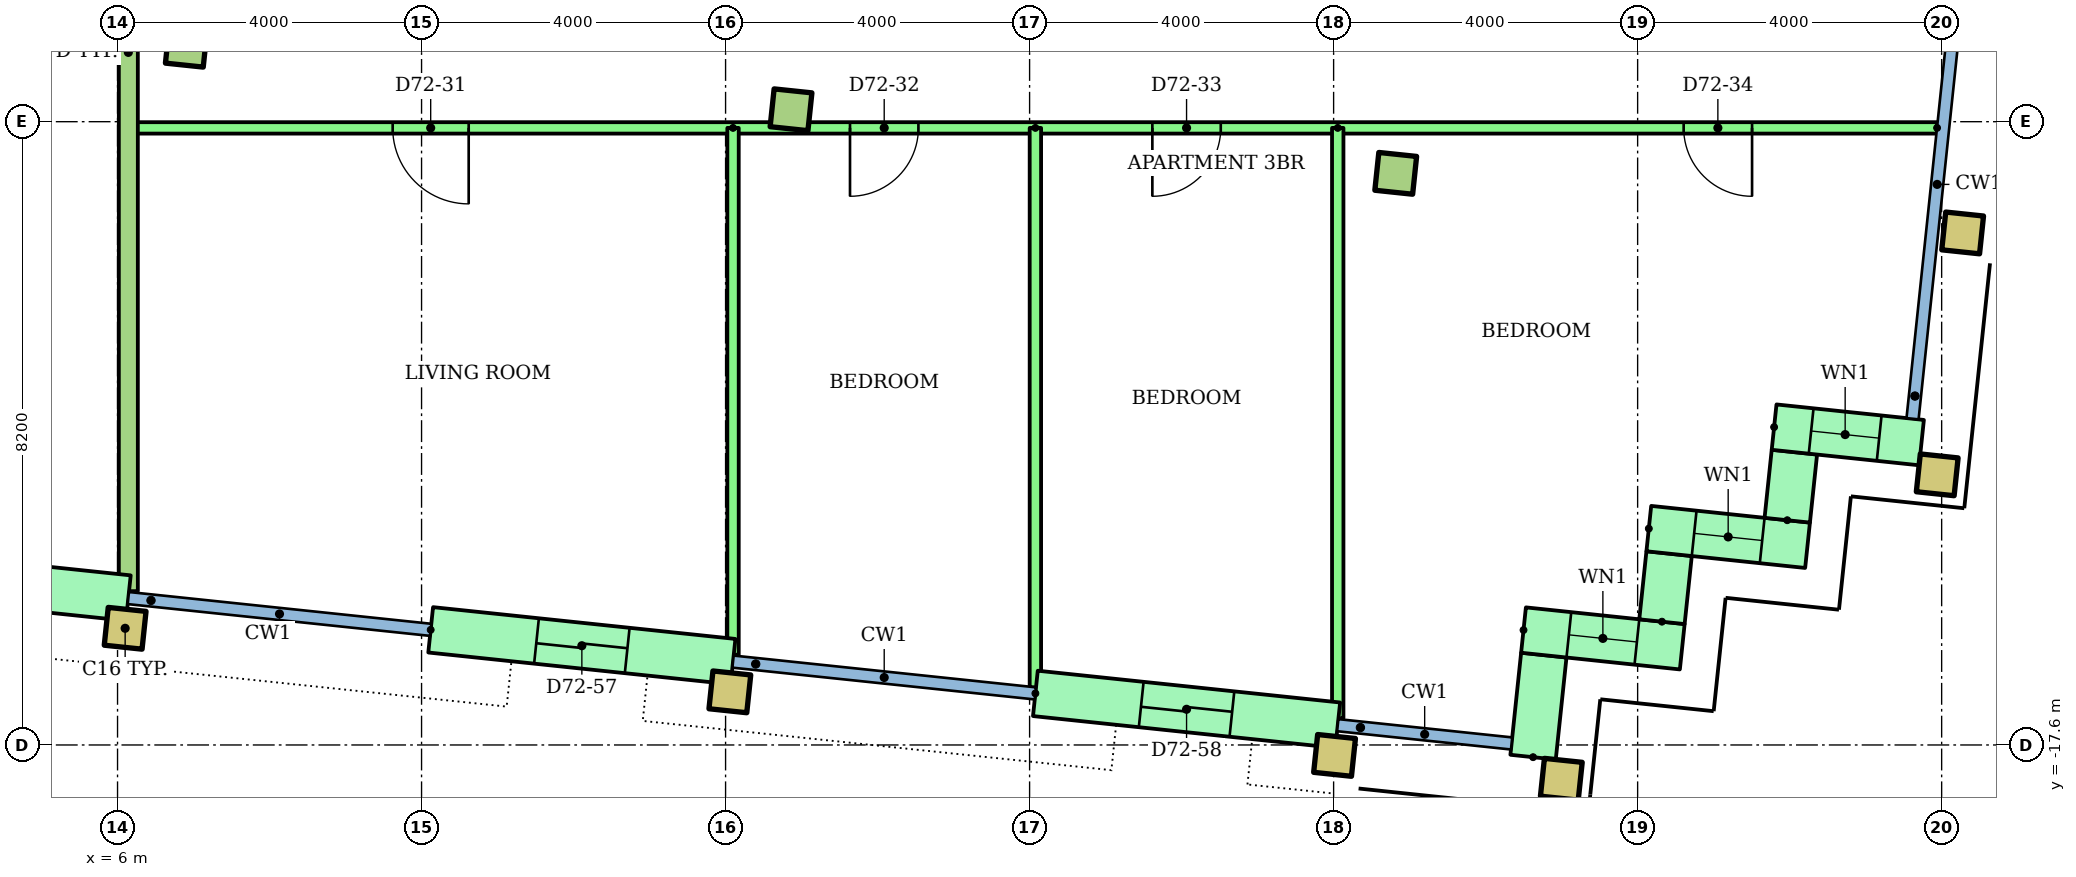
"""IFC4 building model, lengths in metres.
Left out: names, types, materials, properties, quantities, classifications, styles, units other than length and angle.
Written with IfcOpenShell. Run it as: python <this file> out.ifc"""

import sys

from ifc_helpers import new_model, si_unit, direction, frame, frame_2d, origin, origin_2d, place, context, subcontext, project, spatial, rectangle, hollow_rectangle, extrude, element, fill, save


model = new_model("IFC4")
c1 = context("Model", 3, precision=1e-05, world=origin(), true_north=direction((0.0, 1.0)))
c2 = subcontext(c1, "Body", "Model", "MODEL_VIEW")
j1 = project(units=[si_unit("LENGTHUNIT", "METRE"), si_unit("PLANEANGLEUNIT", "RADIAN")], contexts=[c1])
p1 = place(None, origin())
s1 = spatial("IfcSite", under=j1, at=p1, CompositionType="ELEMENT")
p2 = place(p1, origin())
s2 = spatial("IfcBuilding", under=s1, at=p2, CompositionType="ELEMENT")
p3 = place(p2, frame((0.0, 0.0, 275.5)))
s3 = spatial("IfcBuildingStorey", under=s2, at=p3, CompositionType="ELEMENT", Elevation=275.5)
for number, where, z_axis, x_axis in (
    (1, (6.1, -16.065, 0.0), (0.0, 0.0, 1.0), (0.995, -0.105, 0.0)),
    (2, (14.056, -16.901, 0.0), (0.0, 0.0, 1.0), (0.995, -0.105, 0.0)),
    (3, (22.012, -17.737, 0.0), (0.0, 0.0, 1.0), (0.995, -0.105, 0.0)),
    (4, (24.996, -18.051, 0.0), (0.0, 0.0, 1.0), (0.995, -0.105, 0.0)),
    (5, (29.942, -14.046, 0.0), (0.0, 0.0, 1.0), (0.995, -0.105, 0.0)),
):
    element("IfcColumn", number, at=place(p3, frame(where, z_axis=z_axis, x_axis=x_axis)), inside=s3, PredefinedType="COLUMN", context=c2, shape_type="SweptSolid", body=[
        extrude(hollow_rectangle(XDim=0.5, YDim=0.5, WallThickness=0.025, at=origin_2d()), origin(), (0.0, 0.0, 1.0), 3.2),
    ])
for number, where, z_axis, x_axis in (
    (6, (6.905, -8.407, 0.0), (0.0, 0.0, 1.0), (0.995, -0.105, 0.0)),
    (7, (14.861, -9.243, 0.0), (0.0, 0.0, 1.0), (0.995, -0.105, 0.0)),
    (8, (22.817, -10.08, 0.0), (0.0, 0.0, 1.0), (0.995, -0.105, 0.0)),
):
    element("IfcColumn", number, at=place(p3, frame(where, z_axis=z_axis, x_axis=x_axis)), inside=s3, PredefinedType="COLUMN", context=c2, shape_type="SweptSolid", body=[
        extrude(rectangle(XDim=0.5, YDim=0.5, at=origin_2d()), origin(), (0.0, 0.0, 1.0), 3.2),
    ])
p4 = place(p3, frame((30.276, -10.864, 0.0), z_axis=(0.0, 0.0, 1.0), x_axis=(0.994521895368, -0.104528463268, 0.0)))
e9 = element("IfcColumn", 9, at=p4, inside=s3, PredefinedType="COLUMN", context=c2, shape_type="SweptSolid", body=[
    extrude(hollow_rectangle(XDim=0.5, YDim=0.5, WallThickness=0.025, at=origin_2d()), origin(), (0.0, 0.0, 1.0), 3.2),
])
p5 = place(p3, frame((2.164, -15.249, 0.0), z_axis=(0.0, 0.0, 1.0), x_axis=(0.99452550138, -0.104494148666, 0.0)))
e10 = element("IfcWall", 10, at=p5, inside=s3, PredefinedType="STANDARD", context=c2, shape_type="SweptSolid", body=[
    extrude(rectangle(XDim=4.0, YDim=0.6, at=frame_2d((2.0, 0.0))), origin(), (0.0, 0.0, 1.0), 2.92),
])
p6 = place(p5, frame((1.4, 0.0, 0.0)))
e11 = element("IfcOpeningElement", 11, at=p6, cuts=e10, PredefinedType="OPENING", context=c2, shape_type="SweptSolid", body=[
    extrude(rectangle(XDim=1.2, YDim=2.1, at=frame_2d((0.6, 1.05))), frame((0.0, 0.31, 0.0), z_axis=(0.0, -1.0, 0.0), x_axis=(1.0, 0.0, 0.0)), (0.0, 0.0, 1.0), 0.62),
])
p7 = place(p3, frame((10.12, -16.085, 0.0), z_axis=(0.0, 0.0, 1.0), x_axis=(0.994519156568, -0.104554517933, 0.0)))
e12 = element("IfcWall", 12, at=p7, inside=s3, PredefinedType="STANDARD", context=c2, shape_type="SweptSolid", body=[
    extrude(rectangle(XDim=4.0, YDim=0.6, at=frame_2d((2.0, 0.0))), origin(), (0.0, 0.0, 1.0), 2.92),
])
p8 = place(p7, frame((1.4, 0.0, 0.0)))
e13 = element("IfcOpeningElement", 13, at=p8, cuts=e12, PredefinedType="OPENING", context=c2, shape_type="SweptSolid", body=[
    extrude(rectangle(XDim=1.2, YDim=2.1, at=frame_2d((0.6, 1.05))), frame((0.0, 0.31, 0.0), z_axis=(0.0, -1.0, 0.0), x_axis=(1.0, 0.0, 0.0)), (0.0, 0.0, 1.0), 0.62),
])
p9 = place(p3, frame((18.076, -16.921, 0.0), z_axis=(0.0, 0.0, 1.0), x_axis=(0.994519156568, -0.104554517933, 0.0)))
e14 = element("IfcWall", 14, at=p9, inside=s3, PredefinedType="STANDARD", context=c2, shape_type="SweptSolid", body=[
    extrude(rectangle(XDim=4.0, YDim=0.6, at=frame_2d((2.0, 0.0))), origin(), (0.0, 0.0, 1.0), 2.92),
])
p10 = place(p9, frame((1.4, 0.0, 0.0)))
e15 = element("IfcOpeningElement", 15, at=p10, cuts=e14, PredefinedType="OPENING", context=c2, shape_type="SweptSolid", body=[
    extrude(rectangle(XDim=1.2, YDim=2.1, at=frame_2d((0.6, 1.05))), frame((0.0, 0.31, 0.0), z_axis=(0.0, -1.0, 0.0), x_axis=(1.0, 0.0, 0.0)), (0.0, 0.0, 1.0), 0.62),
])
p11 = place(p3, frame((24.625, -17.76, 0.0), z_axis=(0.0, 0.0, 1.0), x_axis=(0.104355269718, 0.994540083497, 0.0)))
e16 = element("IfcWall", 16, at=p11, inside=s3, PredefinedType="STANDARD", context=c2, shape_type="SweptSolid", body=[
    extrude(rectangle(XDim=1.35, YDim=0.6, at=frame_2d((0.675, 0.0))), origin(), (0.0, 0.0, 1.0), 2.92),
])
p12 = place(p3, frame((24.499, -16.088, 0.0), z_axis=(0.0, 0.0, 1.0), x_axis=(0.994522640205, -0.104521376379, 0.0)))
e17 = element("IfcWall", 17, at=p12, inside=s3, PredefinedType="STANDARD", context=c2, shape_type="SweptSolid", body=[
    extrude(rectangle(XDim=2.1, YDim=0.6, at=frame_2d((1.05, 0.0))), origin(), (0.0, 0.0, 1.0), 2.92),
])
p13 = place(p12, frame((0.6, 0.0, 0.9)))
e18 = element("IfcOpeningElement", 18, at=p13, cuts=e17, PredefinedType="OPENING", context=c2, shape_type="SweptSolid", body=[
    extrude(rectangle(XDim=0.9, YDim=1.5, at=frame_2d((0.45, 0.75))), frame((0.0, 0.31, 0.0), z_axis=(0.0, -1.0, 0.0), x_axis=(1.0, 0.0, 0.0)), (0.0, 0.0, 1.0), 0.62),
])
p14 = place(p3, frame((26.32, -15.978, 0.0), z_axis=(0.0, 0.0, 1.0), x_axis=(0.104444712852, 0.994530694326, 0.0)))
e19 = element("IfcWall", 19, at=p14, inside=s3, PredefinedType="STANDARD", context=c2, shape_type="SweptSolid", body=[
    extrude(rectangle(XDim=0.9, YDim=0.6, at=frame_2d((0.45, 0.0))), origin(), (0.0, 0.0, 1.0), 2.92),
])
p15 = place(p3, frame((26.147, -14.753, 0.0), z_axis=(0.0, 0.0, 1.0), x_axis=(0.994522640205, -0.104521376379, 0.0)))
e20 = element("IfcWall", 20, at=p15, inside=s3, PredefinedType="STANDARD", context=c2, shape_type="SweptSolid", body=[
    extrude(rectangle(XDim=2.1, YDim=0.6, at=frame_2d((1.05, 0.0))), origin(), (0.0, 0.0, 1.0), 2.92),
])
p16 = place(p15, frame((0.6, 0.0, 0.9)))
e21 = element("IfcOpeningElement", 21, at=p16, cuts=e20, PredefinedType="OPENING", context=c2, shape_type="SweptSolid", body=[
    extrude(rectangle(XDim=0.9, YDim=1.5, at=frame_2d((0.45, 0.75))), frame((0.0, 0.31, 0.0), z_axis=(0.0, -1.0, 0.0), x_axis=(1.0, 0.0, 0.0)), (0.0, 0.0, 1.0), 0.62),
])
p17 = place(p3, frame((27.969, -14.643, 0.0), z_axis=(0.0, 0.0, 1.0), x_axis=(0.104416541099, 0.994533652495, 0.0)))
e22 = element("IfcWall", 22, at=p17, inside=s3, PredefinedType="STANDARD", context=c2, shape_type="SweptSolid", body=[
    extrude(rectangle(XDim=0.9, YDim=0.6, at=frame_2d((0.45, 0.0))), origin(), (0.0, 0.0, 1.0), 2.92),
])
p18 = place(p3, frame((27.796, -13.418, 0.0), z_axis=(0.0, 0.0, 1.0), x_axis=(0.994519850893, -0.104547913319, 0.0)))
e23 = element("IfcWall", 23, at=p18, inside=s3, PredefinedType="STANDARD", context=c2, shape_type="SweptSolid", body=[
    extrude(rectangle(XDim=1.95, YDim=0.6, at=frame_2d((0.975, 0.0))), origin(), (0.0, 0.0, 1.0), 2.92),
])
p19 = place(p18, frame((0.49, 0.0, 0.9)))
e24 = element("IfcOpeningElement", 24, at=p19, cuts=e23, PredefinedType="OPENING", context=c2, shape_type="SweptSolid", body=[
    extrude(rectangle(XDim=0.9, YDim=1.5, at=frame_2d((0.45, 0.75))), frame((0.0, 0.31, 0.0), z_axis=(0.0, -1.0, 0.0), x_axis=(1.0, 0.0, 0.0)), (0.0, 0.0, 1.0), 0.62),
])
p20 = place(p3, frame((29.94, -9.482, 0.0), z_axis=(0.0, 0.0, 1.0), x_axis=(-1.0, 0.0, 0.0)))
e25 = element("IfcWall", 25, at=p20, inside=s3, PredefinedType="PARTITIONING", context=c2, shape_type="SweptSolid", body=[
    extrude(rectangle(XDim=23.798, YDim=0.15, at=frame_2d((11.899, 0.0))), origin(), (0.0, 0.0, 1.0), 2.4),
])
p21 = place(p20, frame((19.32, 0.0, 0.0)))
e26 = element("IfcOpeningElement", 26, at=p21, cuts=e25, PredefinedType="OPENING", context=c2, shape_type="SweptSolid", body=[
    extrude(rectangle(XDim=1.0, YDim=2.1, at=frame_2d((0.5, 1.05))), frame((0.0, 0.085, 0.0), z_axis=(0.0, -1.0, 0.0), x_axis=(1.0, 0.0, 0.0)), (0.0, 0.0, 1.0), 0.17),
])
p22 = place(p20, frame((13.403, 0.0, 0.0)))
e27 = element("IfcOpeningElement", 27, at=p22, cuts=e25, PredefinedType="OPENING", context=c2, shape_type="SweptSolid", body=[
    extrude(rectangle(XDim=0.9, YDim=2.1, at=frame_2d((0.45, 1.05))), frame((0.0, 0.085, 0.0), z_axis=(0.0, -1.0, 0.0), x_axis=(1.0, 0.0, 0.0)), (0.0, 0.0, 1.0), 0.17),
])
p23 = place(p20, frame((9.425, 0.0, 0.0)))
e28 = element("IfcOpeningElement", 28, at=p23, cuts=e25, PredefinedType="OPENING", context=c2, shape_type="SweptSolid", body=[
    extrude(rectangle(XDim=0.9, YDim=2.1, at=frame_2d((0.45, 1.05))), frame((0.0, 0.085, 0.0), z_axis=(0.0, -1.0, 0.0), x_axis=(1.0, 0.0, 0.0)), (0.0, 0.0, 1.0), 0.17),
])
p24 = place(p20, frame((2.434, 0.0, 0.0)))
e29 = element("IfcOpeningElement", 29, at=p24, cuts=e25, PredefinedType="OPENING", context=c2, shape_type="SweptSolid", body=[
    extrude(rectangle(XDim=0.9, YDim=2.1, at=frame_2d((0.45, 1.05))), frame((0.0, 0.085, 0.0), z_axis=(0.0, -1.0, 0.0), x_axis=(1.0, 0.0, 0.0)), (0.0, 0.0, 1.0), 0.17),
])
p25 = place(p3, frame((14.098, -9.482, 0.0), z_axis=(0.0, 0.0, 1.0), x_axis=(0.0, -1.0, 0.0)))
e30 = element("IfcWall", 30, at=p25, inside=s3, PredefinedType="PARTITIONING", context=c2, shape_type="SweptSolid", body=[
    extrude(rectangle(XDim=6.931, YDim=0.15, at=frame_2d((3.466, 0.0))), origin(), (0.0, 0.0, 1.0), 2.4),
])
p26 = place(p3, frame((18.076, -9.482, 0.0), z_axis=(0.0, 0.0, 1.0), x_axis=(0.0, -1.0, 0.0)))
e31 = element("IfcWall", 31, at=p26, inside=s3, PredefinedType="PARTITIONING", context=c2, shape_type="SweptSolid", body=[
    extrude(rectangle(XDim=7.36, YDim=0.15, at=frame_2d((3.68, 0.0))), origin(), (0.0, 0.0, 1.0), 2.4),
])
p27 = place(p3, frame((22.054, -9.482, 0.0), z_axis=(0.0, 0.0, 1.0), x_axis=(0.0, -1.0, 0.0)))
e32 = element("IfcWall", 32, at=p27, inside=s3, PredefinedType="PARTITIONING", context=c2, shape_type="SweptSolid", body=[
    extrude(rectangle(XDim=7.767, YDim=0.15, at=frame_2d((3.884, 0.0))), origin(), (0.0, 0.0, 1.0), 2.4),
])
p28 = place(p3, frame((6.142, -1.4, 0.0), z_axis=(0.0, 0.0, 1.0), x_axis=(0.0, -1.0, 0.0)))
e33 = element("IfcWall", 33, at=p28, inside=s3, PredefinedType="PARTITIONING", context=c2, shape_type="SweptSolid", body=[
    extrude(rectangle(XDim=14.177, YDim=0.25, at=frame_2d((7.088, 0.0))), origin(), (0.0, 0.0, 1.0), 2.4),
])
p29 = place(p13, origin())
e34 = element("IfcWindow", 34, at=p29, inside=s3, PartitioningType="SINGLE_PANEL", PredefinedType="WINDOW", context=c2, shape_type="SweptSolid", body=[
    extrude(rectangle(XDim=0.9, YDim=1.5, at=frame_2d((0.45, 0.75))), frame((0.0, 0.03, 0.0), z_axis=(0.0, -1.0, 0.0), x_axis=(1.0, 0.0, 0.0)), (0.0, 0.0, 1.0), 0.06),
])
fill(e18, e34)
p30 = place(p16, origin())
e35 = element("IfcWindow", 35, at=p30, inside=s3, PartitioningType="SINGLE_PANEL", PredefinedType="WINDOW", context=c2, shape_type="SweptSolid", body=[
    extrude(rectangle(XDim=0.9, YDim=1.5, at=frame_2d((0.45, 0.75))), frame((0.0, 0.03, 0.0), z_axis=(0.0, -1.0, 0.0), x_axis=(1.0, 0.0, 0.0)), (0.0, 0.0, 1.0), 0.06),
])
fill(e21, e35)
p31 = place(p19, origin())
e36 = element("IfcWindow", 36, at=p31, inside=s3, PartitioningType="SINGLE_PANEL", PredefinedType="WINDOW", context=c2, shape_type="SweptSolid", body=[
    extrude(rectangle(XDim=0.9, YDim=1.5, at=frame_2d((0.45, 0.75))), frame((0.0, 0.03, 0.0), z_axis=(0.0, -1.0, 0.0), x_axis=(1.0, 0.0, 0.0)), (0.0, 0.0, 1.0), 0.06),
])
fill(e24, e36)
p32 = place(p21, origin())
e37 = element("IfcDoor", 37, at=p32, inside=s3, OperationType="SINGLE_SWING_LEFT", PredefinedType="DOOR", context=c2, shape_type="SweptSolid", body=[
    extrude(rectangle(XDim=1.0, YDim=2.1, at=frame_2d((0.5, 1.05))), frame((0.0, 0.025, 0.0), z_axis=(0.0, -1.0, 0.0), x_axis=(1.0, 0.0, 0.0)), (0.0, 0.0, 1.0), 0.05),
])
fill(e26, e37)
p33 = place(p22, origin())
e38 = element("IfcDoor", 38, at=p33, inside=s3, OperationType="SINGLE_SWING_RIGHT", PredefinedType="DOOR", context=c2, shape_type="SweptSolid", body=[
    extrude(rectangle(XDim=0.9, YDim=2.1, at=frame_2d((0.45, 1.05))), frame((0.0, 0.025, 0.0), z_axis=(0.0, -1.0, 0.0), x_axis=(1.0, 0.0, 0.0)), (0.0, 0.0, 1.0), 0.05),
])
fill(e27, e38)
p34 = place(p23, origin())
e39 = element("IfcDoor", 39, at=p34, inside=s3, OperationType="SINGLE_SWING_RIGHT", PredefinedType="DOOR", context=c2, shape_type="SweptSolid", body=[
    extrude(rectangle(XDim=0.9, YDim=2.1, at=frame_2d((0.45, 1.05))), frame((0.0, 0.025, 0.0), z_axis=(0.0, -1.0, 0.0), x_axis=(1.0, 0.0, 0.0)), (0.0, 0.0, 1.0), 0.05),
])
fill(e28, e39)
p35 = place(p24, origin())
e40 = element("IfcDoor", 40, at=p35, inside=s3, OperationType="SINGLE_SWING_LEFT", PredefinedType="DOOR", context=c2, shape_type="SweptSolid", body=[
    extrude(rectangle(XDim=0.9, YDim=2.1, at=frame_2d((0.45, 1.05))), frame((0.0, 0.025, 0.0), z_axis=(0.0, -1.0, 0.0), x_axis=(1.0, 0.0, 0.0)), (0.0, 0.0, 1.0), 0.05),
])
fill(e29, e40)
p36 = place(p8, origin())
e41 = element("IfcDoor", 41, at=p36, inside=s3, OperationType="SLIDING_TO_LEFT", PredefinedType="DOOR", context=c2, shape_type="SweptSolid", body=[
    extrude(rectangle(XDim=1.2, YDim=2.1, at=frame_2d((0.6, 1.05))), frame((0.0, 0.025, 0.0), z_axis=(0.0, -1.0, 0.0), x_axis=(1.0, 0.0, 0.0)), (0.0, 0.0, 1.0), 0.05),
])
fill(e13, e41)
p37 = place(p10, origin())
e42 = element("IfcDoor", 42, at=p37, inside=s3, OperationType="SLIDING_TO_LEFT", PredefinedType="DOOR", context=c2, shape_type="SweptSolid", body=[
    extrude(rectangle(XDim=1.2, YDim=2.1, at=frame_2d((0.6, 1.05))), frame((0.0, 0.025, 0.0), z_axis=(0.0, -1.0, 0.0), x_axis=(1.0, 0.0, 0.0)), (0.0, 0.0, 1.0), 0.05),
])
fill(e15, e42)
save(model, sys.argv[1])
